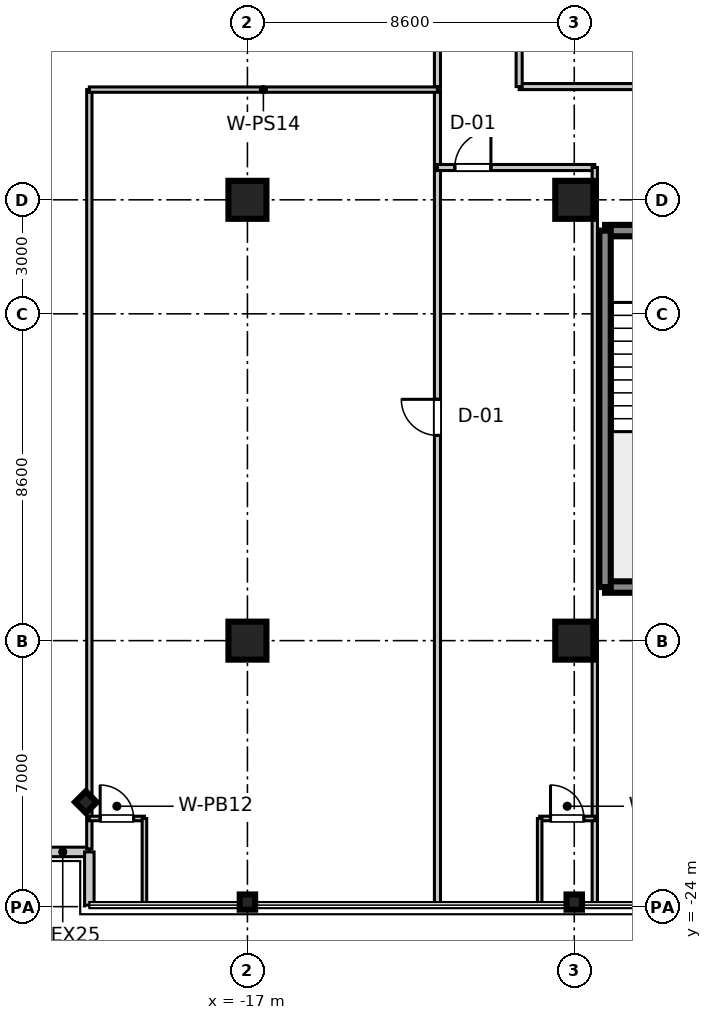
"""IFC4 building model, lengths in metres.
Left out: names, types, materials, properties, quantities, classifications, styles, units other than length and angle.
Written with IfcOpenShell. Run it as: python <this file> out.ifc"""

import sys

from ifc_helpers import new_model, si_unit, direction, frame, frame_2d, origin, origin_2d, place, context, subcontext, project, spatial, rectangle, i_section, extrude, source, transform, mapped, element, fill, save


model = new_model("IFC4")
c1 = context("Model", 3, precision=1e-05, world=origin(), true_north=direction((0.0, 1.0)))
c2 = subcontext(c1, "Body", "Model", "MODEL_VIEW")
j1 = project(units=[si_unit("LENGTHUNIT", "METRE"), si_unit("PLANEANGLEUNIT", "RADIAN")], contexts=[c1])
p1 = place(None, origin())
s1 = spatial("IfcSite", under=j1, at=p1, CompositionType="ELEMENT")
p2 = place(p1, origin())
s2 = spatial("IfcBuilding", under=s1, at=p2, CompositionType="ELEMENT")
p3 = place(p2, frame((0.0, 0.0, 241.9)))
s3 = spatial("IfcBuildingStorey", under=s2, at=p3, CompositionType="ELEMENT", Elevation=241.9)
m1 = source(origin(), c2, "Body", "SweptSolid", [
    extrude(rectangle(XDim=1.0, YDim=1.0, at=origin_2d()), origin(), (0.0, 0.0, 1.0), 3.655),
])
for number, where, z_axis, x_axis in (
    (1, (-17.0, -17.0, 0.0), (0.0, 0.0, 1.0), (1.0, 0.0, 0.0)),
    (2, (-17.0, -5.4, 0.0), (0.0, 0.0, 1.0), (1.0, 0.0, 0.0)),
    (3, (-8.4, -17.0, 0.0), (0.0, 0.0, 1.0), (1.0, 0.0, 0.0)),
    (4, (-8.4, -5.4, 0.0), (0.0, 0.0, 1.0), (1.0, 0.0, 0.0)),
):
    element("IfcColumn", number, at=place(p3, frame(where, z_axis=z_axis, x_axis=x_axis)), inside=s3, PredefinedType="COLUMN", context=c2, shape_type="MappedRepresentation", body=[
        mapped(m1, transform((0.0, 0.0, 0.0), scale=1.0)),
    ])
m2 = source(origin(), c2, "Body", "SweptSolid", [
    extrude(i_section(OverallWidth=0.401, OverallDepth=0.406, WebThickness=0.016, FlangeThickness=0.025, at=origin_2d()), origin(), (0.0, 0.0, 1.0), 3.655),
])
for number, where, z_axis, x_axis in (
    (5, (-17.0, -23.88, 0.0), (0.0, 0.0, 1.0), (0.0, 1.0, 0.0)),
    (6, (-8.4, -23.88, 0.0), (0.0, 0.0, 1.0), (0.0, 1.0, 0.0)),
    (7, (-21.25, -21.25, 0.0), (0.0, 0.0, 1.0), (0.707, 0.707, 0.0)),
):
    element("IfcColumn", number, at=place(p3, frame(where, z_axis=z_axis, x_axis=x_axis)), inside=s3, PredefinedType="COLUMN", context=c2, shape_type="MappedRepresentation", body=[
        mapped(m2, transform((0.0, 0.0, 0.0), scale=1.0)),
    ])
m3 = source(origin(), c2, "Body", "SweptSolid", [
    extrude(rectangle(XDim=3.98, YDim=0.3, at=frame_2d((1.99, 0.0))), origin(), (0.0, 0.0, 1.0), 3.41),
])
p4 = place(p3, frame((-7.59, -15.59, 0.0), z_axis=(0.0, 0.0, 1.0), x_axis=(1.0, 0.0, 0.0)))
e8 = element("IfcWall", 8, at=p4, inside=s3, PredefinedType="SHEAR", context=c2, shape_type="MappedRepresentation", body=[
    mapped(m3, transform((0.0, 0.0, 0.0), scale=1.0)),
])
p5 = place(p3, frame((-7.59, -6.21, 0.0), z_axis=(0.0, 0.0, 1.0), x_axis=(1.0, 0.0, 0.0)))
e9 = element("IfcWall", 9, at=p5, inside=s3, PredefinedType="SHEAR", context=c2, shape_type="MappedRepresentation", body=[
    mapped(m3, transform((0.0, 0.0, 0.0), scale=1.0)),
])
p6 = place(p5, frame((1.44, 0.0, 0.0)))
e10 = element("IfcOpeningElement", 10, at=p6, cuts=e9, PredefinedType="OPENING", context=c2, shape_type="SweptSolid", body=[
    extrude(rectangle(XDim=1.1, YDim=2.15, at=frame_2d((0.55, 1.075))), frame((0.0, 0.16, 0.0), z_axis=(0.0, -1.0, 0.0), x_axis=(1.0, 0.0, 0.0)), (0.0, 0.0, 1.0), 0.32),
])
m4 = source(origin(), c2, "Body", "SweptSolid", [
    extrude(rectangle(XDim=9.38, YDim=0.3, at=frame_2d((4.69, 0.0))), origin(), (0.0, 0.0, 1.0), 3.41),
])
p7 = place(p3, frame((-7.59, -15.59, 0.0), z_axis=(0.0, 0.0, 1.0), x_axis=(0.0, 1.0, 0.0)))
e11 = element("IfcWall", 11, at=p7, inside=s3, PredefinedType="SHEAR", context=c2, shape_type="MappedRepresentation", body=[
    mapped(m4, transform((0.0, 0.0, 0.0), scale=1.0)),
])
m5 = source(origin(), c2, "Body", "SweptSolid", [
    extrude(rectangle(XDim=1.4, YDim=0.25, at=frame_2d((0.7, 0.0))), origin(), (0.0, 0.0, 1.0), 3.41),
])
p8 = place(p3, frame((-22.56, -22.56, 0.0), z_axis=(0.0, 0.0, 1.0), x_axis=(1.0, 0.0, 0.0)))
e12 = element("IfcWall", 12, at=p8, inside=s3, PredefinedType="STANDARD", context=c2, shape_type="MappedRepresentation", body=[
    mapped(m5, transform((0.0, 0.0, 0.0), scale=1.0)),
])
m6 = source(origin(), c2, "Body", "SweptSolid", [
    extrude(rectangle(XDim=1.4, YDim=0.25, at=frame_2d((0.7, 0.0))), origin(), (0.0, 0.0, 1.0), 3.41),
])
p9 = place(p3, frame((-21.16, -23.96, 0.0), z_axis=(0.0, 0.0, 1.0), x_axis=(0.0, 1.0, 0.0)))
e13 = element("IfcWall", 13, at=p9, inside=s3, PredefinedType="STANDARD", context=c2, shape_type="MappedRepresentation", body=[
    mapped(m6, transform((0.0, 0.0, 0.0), scale=1.0)),
])
m7 = source(origin(), c2, "Body", "SweptSolid", [
    extrude(rectangle(XDim=21.4, YDim=0.16, at=frame_2d((10.7, 0.0))), origin(), (0.0, 0.0, 1.0), 2.75),
])
p10 = place(p3, frame((-12.0, -23.9, 0.0), z_axis=(0.0, 0.0, 1.0), x_axis=(0.0, 1.0, 0.0)))
e14 = element("IfcWall", 14, at=p10, inside=s3, PredefinedType="PARTITIONING", context=c2, shape_type="MappedRepresentation", body=[
    mapped(m7, transform((0.0, 0.0, 0.0), scale=1.0)),
])
p11 = place(p10, frame((12.3, 0.0, 0.0)))
e15 = element("IfcOpeningElement", 15, at=p11, cuts=e14, PredefinedType="OPENING", context=c2, shape_type="SweptSolid", body=[
    extrude(rectangle(XDim=0.95, YDim=2.1, at=frame_2d((0.475, 1.05))), frame((0.0, 0.09, 0.0), z_axis=(0.0, -1.0, 0.0), x_axis=(1.0, 0.0, 0.0)), (0.0, 0.0, 1.0), 0.18),
])
m8 = source(origin(), c2, "Body", "SweptSolid", [
    extrude(rectangle(XDim=19.98, YDim=0.14, at=frame_2d((9.99, 0.0))), origin(), (0.0, 0.0, 1.0), 2.75),
])
p12 = place(p3, frame((-21.16, -22.48, 0.0), z_axis=(0.0, 0.0, 1.0), x_axis=(0.0, 1.0, 0.0)))
e16 = element("IfcWall", 16, at=p12, inside=s3, PredefinedType="PARTITIONING", context=c2, shape_type="MappedRepresentation", body=[
    mapped(m8, transform((0.0, 0.0, 0.0), scale=1.0)),
])
m9 = source(origin(), c2, "Body", "SweptSolid", [
    extrude(rectangle(XDim=9.16, YDim=0.14, at=frame_2d((4.58, 0.0))), origin(), (0.0, 0.0, 1.0), 2.75),
])
p13 = place(p3, frame((-21.16, -2.5, 0.0), z_axis=(0.0, 0.0, 1.0), x_axis=(1.0, 0.0, 0.0)))
e17 = element("IfcWall", 17, at=p13, inside=s3, PredefinedType="PARTITIONING", context=c2, shape_type="MappedRepresentation", body=[
    mapped(m9, transform((0.0, 0.0, 0.0), scale=1.0)),
])
m10 = source(origin(), c2, "Body", "SweptSolid", [
    extrude(rectangle(XDim=1.45, YDim=0.12, at=frame_2d((0.725, 0.0))), origin(), (0.0, 0.0, 1.0), 2.75),
])
p14 = place(p3, frame((-21.16, -21.68, 0.0), z_axis=(0.0, 0.0, 1.0), x_axis=(1.0, 0.0, 0.0)))
e18 = element("IfcWall", 18, at=p14, inside=s3, PredefinedType="PARTITIONING", context=c2, shape_type="MappedRepresentation", body=[
    mapped(m10, transform((0.0, 0.0, 0.0), scale=1.0)),
])
p15 = place(p14, frame((0.285, 0.0, 0.0)))
e19 = element("IfcOpeningElement", 19, at=p15, cuts=e18, PredefinedType="OPENING", context=c2, shape_type="SweptSolid", body=[
    extrude(rectangle(XDim=0.88, YDim=2.1, at=frame_2d((0.44, 1.05))), frame((0.0, 0.07, 0.0), z_axis=(0.0, -1.0, 0.0), x_axis=(1.0, 0.0, 0.0)), (0.0, 0.0, 1.0), 0.14),
])
m11 = source(origin(), c2, "Body", "SweptSolid", [
    extrude(rectangle(XDim=2.22, YDim=0.12, at=frame_2d((1.11, 0.0))), origin(), (0.0, 0.0, 1.0), 2.75),
])
p16 = place(p3, frame((-19.71, -23.9, 0.0), z_axis=(0.0, 0.0, 1.0), x_axis=(0.0, 1.0, 0.0)))
e20 = element("IfcWall", 20, at=p16, inside=s3, PredefinedType="PARTITIONING", context=c2, shape_type="MappedRepresentation", body=[
    mapped(m11, transform((0.0, 0.0, 0.0), scale=1.0)),
])
m12 = source(origin(), c2, "Body", "SweptSolid", [
    extrude(rectangle(XDim=4.14, YDim=0.16, at=frame_2d((2.07, 0.0))), origin(), (0.0, 0.0, 1.0), 2.75),
])
p17 = place(p3, frame((-12.0, -4.55, 0.0), z_axis=(0.0, 0.0, 1.0), x_axis=(1.0, 0.0, 0.0)))
e21 = element("IfcWall", 21, at=p17, inside=s3, PredefinedType="PARTITIONING", context=c2, shape_type="MappedRepresentation", body=[
    mapped(m12, transform((0.0, 0.0, 0.0), scale=1.0)),
])
p18 = place(p17, frame((0.457, 0.0, 0.0)))
e22 = element("IfcOpeningElement", 22, at=p18, cuts=e21, PredefinedType="OPENING", context=c2, shape_type="SweptSolid", body=[
    extrude(rectangle(XDim=0.95, YDim=2.1, at=frame_2d((0.475, 1.05))), frame((0.0, 0.09, 0.0), z_axis=(0.0, -1.0, 0.0), x_axis=(1.0, 0.0, 0.0)), (0.0, 0.0, 1.0), 0.18),
])
m13 = source(origin(), c2, "Body", "SweptSolid", [
    extrude(rectangle(XDim=19.35, YDim=0.14, at=frame_2d((9.675, 0.0))), origin(), (0.0, 0.0, 1.0), 2.75),
])
p19 = place(p3, frame((-7.86, -23.9, 0.0), z_axis=(0.0, 0.0, 1.0), x_axis=(0.0, 1.0, 0.0)))
e23 = element("IfcWall", 23, at=p19, inside=s3, PredefinedType="PARTITIONING", context=c2, shape_type="MappedRepresentation", body=[
    mapped(m13, transform((0.0, 0.0, 0.0), scale=1.0)),
])
p20 = place(p3, frame((-9.31, -21.68, 0.0), z_axis=(0.0, 0.0, 1.0), x_axis=(1.0, 0.0, 0.0)))
e24 = element("IfcWall", 24, at=p20, inside=s3, PredefinedType="PARTITIONING", context=c2, shape_type="MappedRepresentation", body=[
    mapped(m10, transform((0.0, 0.0, 0.0), scale=1.0)),
])
p21 = place(p20, frame((0.285, 0.0, 0.0)))
e25 = element("IfcOpeningElement", 25, at=p21, cuts=e24, PredefinedType="OPENING", context=c2, shape_type="SweptSolid", body=[
    extrude(rectangle(XDim=0.88, YDim=2.1, at=frame_2d((0.44, 1.05))), frame((0.0, 0.07, 0.0), z_axis=(0.0, -1.0, 0.0), x_axis=(1.0, 0.0, 0.0)), (0.0, 0.0, 1.0), 0.14),
])
p22 = place(p3, frame((-9.31, -23.9, 0.0), z_axis=(0.0, 0.0, 1.0), x_axis=(0.0, 1.0, 0.0)))
e26 = element("IfcWall", 26, at=p22, inside=s3, PredefinedType="PARTITIONING", context=c2, shape_type="MappedRepresentation", body=[
    mapped(m11, transform((0.0, 0.0, 0.0), scale=1.0)),
])
m14 = source(origin(), c2, "Body", "SweptSolid", [
    extrude(rectangle(XDim=4.84, YDim=0.16, at=frame_2d((2.42, 0.0))), origin(), (0.0, 0.0, 1.0), 2.75),
])
p23 = place(p3, frame((-12.0, -2.42, 0.0), z_axis=(0.0, 0.0, 1.0), x_axis=(0.0, 1.0, 0.0)))
e27 = element("IfcWall", 27, at=p23, inside=s3, PredefinedType="PARTITIONING", context=c2, shape_type="MappedRepresentation", body=[
    mapped(m14, transform((0.0, 0.0, 0.0), scale=1.0)),
])
p24 = place(p23, frame((1.945, 0.0, 0.0)))
e28 = element("IfcOpeningElement", 28, at=p24, cuts=e27, PredefinedType="OPENING", context=c2, shape_type="SweptSolid", body=[
    extrude(rectangle(XDim=0.95, YDim=2.1, at=frame_2d((0.475, 1.05))), frame((0.0, 0.09, 0.0), z_axis=(0.0, -1.0, 0.0), x_axis=(1.0, 0.0, 0.0)), (0.0, 0.0, 1.0), 0.18),
])
m15 = source(origin(), c2, "Body", "SweptSolid", [
    extrude(rectangle(XDim=4.472, YDim=0.16, at=frame_2d((2.236, 0.0))), origin(), (0.0, 0.0, 1.0), 2.75),
])
p25 = place(p3, frame((-9.85, -2.42, 0.0), z_axis=(0.0, 0.0, 1.0), x_axis=(1.0, 0.0, 0.0)))
e29 = element("IfcWall", 29, at=p25, inside=s3, PredefinedType="PARTITIONING", context=c2, shape_type="MappedRepresentation", body=[
    mapped(m15, transform((0.0, 0.0, 0.0), scale=1.0)),
])
p26 = place(p3, frame((-9.85, -2.42, 0.0), z_axis=(0.0, 0.0, 1.0), x_axis=(0.0, 1.0, 0.0)))
e30 = element("IfcWall", 30, at=p26, inside=s3, PredefinedType="PARTITIONING", context=c2, shape_type="MappedRepresentation", body=[
    mapped(m14, transform((0.0, 0.0, 0.0), scale=1.0)),
])
m16 = source(origin(), c2, "Body", "SweptSolid", [
    extrude(rectangle(XDim=0.88, YDim=2.1, at=frame_2d((0.44, 1.05))), frame((0.0, 0.025, 0.0), z_axis=(0.0, -1.0, 0.0), x_axis=(1.0, 0.0, 0.0)), (0.0, 0.0, 1.0), 0.05),
])
p27 = place(p15, frame((0.88, 0.0, 0.0), z_axis=(0.0, 0.0, 1.0), x_axis=(-1.0, 0.0, 0.0)))
e31 = element("IfcDoor", 31, at=p27, inside=s3, OperationType="SINGLE_SWING_LEFT", PredefinedType="DOOR", context=c2, shape_type="MappedRepresentation", body=[
    mapped(m16, transform((0.0, 0.0, 0.0), scale=1.0)),
])
fill(e19, e31)
m17 = source(origin(), c2, "Body", "SweptSolid", [
    extrude(rectangle(XDim=0.95, YDim=2.1, at=frame_2d((0.475, 1.05))), frame((0.0, 0.025, 0.0), z_axis=(0.0, -1.0, 0.0), x_axis=(1.0, 0.0, 0.0)), (0.0, 0.0, 1.0), 0.05),
])
p28 = place(p11, origin())
e32 = element("IfcDoor", 32, at=p28, inside=s3, OperationType="SINGLE_SWING_RIGHT", PredefinedType="DOOR", context=c2, shape_type="MappedRepresentation", body=[
    mapped(m17, transform((0.0, 0.0, 0.0), scale=1.0)),
])
fill(e15, e32)
p29 = place(p21, frame((0.88, 0.0, 0.0), z_axis=(0.0, 0.0, 1.0), x_axis=(-1.0, 0.0, 0.0)))
e33 = element("IfcDoor", 33, at=p29, inside=s3, OperationType="SINGLE_SWING_LEFT", PredefinedType="DOOR", context=c2, shape_type="MappedRepresentation", body=[
    mapped(m16, transform((0.0, 0.0, 0.0), scale=1.0)),
])
fill(e25, e33)
p30 = place(p18, frame((0.95, 0.0, 0.0), z_axis=(0.0, 0.0, 1.0), x_axis=(-1.0, 0.0, 0.0)))
e34 = element("IfcDoor", 34, at=p30, inside=s3, OperationType="SINGLE_SWING_RIGHT", PredefinedType="DOOR", context=c2, shape_type="MappedRepresentation", body=[
    mapped(m17, transform((0.0, 0.0, 0.0), scale=1.0)),
])
fill(e22, e34)
save(model, sys.argv[1])
